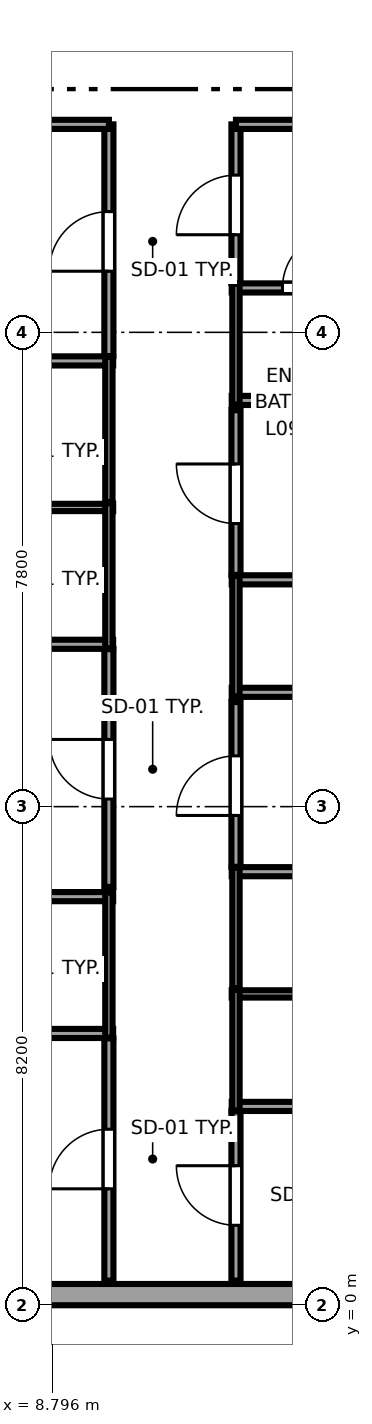
"""IFC4 building model, lengths in metres.
Left out: names, types, materials, properties, quantities, classifications, styles, units other than length and angle.
Written with IfcOpenShell. Run it as: python <this file> out.ifc"""

import sys

from ifc_helpers import new_model, si_unit, direction, frame, frame_2d, origin, place, context, subcontext, project, spatial, rectangle, extrude, source, transform, mapped, element, fill, save


model = new_model("IFC4")
c1 = context("Model", 3, precision=1e-05, world=origin(), true_north=direction((0.0, 1.0)))
c2 = subcontext(c1, "Body", "Model", "MODEL_VIEW")
j1 = project(units=[si_unit("LENGTHUNIT", "METRE"), si_unit("PLANEANGLEUNIT", "RADIAN")], contexts=[c1])
p1 = place(None, origin())
s1 = spatial("IfcSite", under=j1, at=p1, CompositionType="ELEMENT")
p2 = place(p1, origin())
s2 = spatial("IfcBuilding", under=s1, at=p2, CompositionType="ELEMENT")
p3 = place(p2, frame((0.0, 0.0, 42.65)))
s3 = spatial("IfcBuildingStorey", under=s2, at=p3, CompositionType="ELEMENT", Elevation=42.65)
p4 = place(p3, frame((4.617, 0.175, 0.0), z_axis=(0.0, 0.0, 1.0), x_axis=(1.0, 0.0, 0.0)))
e1 = element("IfcWall", 1, at=p4, inside=s3, PredefinedType="SOLIDWALL", context=c2, shape_type="SweptSolid", body=[
    extrude(rectangle(XDim=18.008, YDim=0.35, at=frame_2d((9.004, 0.0))), origin(), (0.0, 0.0, 1.0), 3.37),
])
p5 = place(p4, frame((14.257, 0.0, 0.68)))
e2 = element("IfcOpeningElement", 2, at=p5, cuts=e1, PredefinedType="OPENING", context=c2, shape_type="SweptSolid", body=[
    extrude(rectangle(XDim=2.1, YDim=1.9, at=frame_2d((1.05, 0.95))), frame((0.0, 0.185, 0.0), z_axis=(0.0, -1.0, 0.0), x_axis=(1.0, 0.0, 0.0)), (0.0, 0.0, 1.0), 0.37),
])
for number, where, z_axis, x_axis in (
    (3, (7.21, 4.47, 0.0), (0.0, 0.0, 1.0), (1.0, 0.0, 0.0)),
    (4, (7.21, 6.72, 0.0), (0.0, 0.0, 1.0), (1.0, 0.0, 0.0)),
):
    element("IfcWall", number, at=place(p3, frame(where, z_axis=z_axis, x_axis=x_axis)), inside=s3, PredefinedType="PARTITIONING", context=c2, shape_type="SweptSolid", body=[
        extrude(rectangle(XDim=2.59, YDim=0.15, at=frame_2d((1.295, 0.0))), origin(), (0.0, 0.0, 1.0), 3.37),
    ])
p6 = place(p3, frame((9.73, 4.4, 0.0), z_axis=(0.0, 0.0, 1.0), x_axis=(0.0, 1.0, 0.0)))
e5 = element("IfcWall", 5, at=p6, inside=s3, PredefinedType="PLUMBINGWALL", context=c2, shape_type="SweptSolid", body=[
    extrude(rectangle(XDim=2.39, YDim=0.12, at=frame_2d((1.195, 0.0))), origin(), (0.0, 0.0, 1.0), 3.37),
])
p7 = place(p3, frame((7.21, 10.87, 0.0), z_axis=(0.0, 0.0, 1.0), x_axis=(1.0, 0.0, 0.0)))
e6 = element("IfcWall", 6, at=p7, inside=s3, PredefinedType="PARTITIONING", context=c2, shape_type="SweptSolid", body=[
    extrude(rectangle(XDim=2.59, YDim=0.15, at=frame_2d((1.295, 0.0))), origin(), (0.0, 0.0, 1.0), 3.37),
])
p8 = place(p3, frame((7.21, 13.12, 0.0), z_axis=(0.0, 0.0, 1.0), x_axis=(1.0, 0.0, 0.0)))
e7 = element("IfcWall", 7, at=p8, inside=s3, PredefinedType="PLUMBINGWALL", context=c2, shape_type="SweptSolid", body=[
    extrude(rectangle(XDim=2.59, YDim=0.12, at=frame_2d((1.295, 0.0))), origin(), (0.0, 0.0, 1.0), 3.37),
])
p9 = place(p3, frame((9.73, 10.8, 0.0), z_axis=(0.0, 0.0, 1.0), x_axis=(0.0, 1.0, 0.0)))
e8 = element("IfcWall", 8, at=p9, inside=s3, PredefinedType="PLUMBINGWALL", context=c2, shape_type="SweptSolid", body=[
    extrude(rectangle(XDim=2.39, YDim=0.12, at=frame_2d((1.195, 0.0))), origin(), (0.0, 0.0, 1.0), 3.37),
])
p10 = place(p3, frame((7.21, 15.53, 0.0), z_axis=(0.0, 0.0, 1.0), x_axis=(1.0, 0.0, 0.0)))
e9 = element("IfcWall", 9, at=p10, inside=s3, PredefinedType="PARTITIONING", context=c2, shape_type="SweptSolid", body=[
    extrude(rectangle(XDim=2.59, YDim=0.15, at=frame_2d((1.295, 0.0))), origin(), (0.0, 0.0, 1.0), 3.37),
])
p11 = place(p3, frame((9.73, 13.21, 0.0), z_axis=(0.0, 0.0, 1.0), x_axis=(0.0, 1.0, 0.0)))
e10 = element("IfcWall", 10, at=p11, inside=s3, PredefinedType="PLUMBINGWALL", context=c2, shape_type="SweptSolid", body=[
    extrude(rectangle(XDim=2.39, YDim=0.12, at=frame_2d((1.195, 0.0))), origin(), (0.0, 0.0, 1.0), 3.37),
])
p12 = place(p3, frame((11.75, 3.27, 0.0), z_axis=(0.0, 0.0, 1.0), x_axis=(1.0, 0.0, 0.0)))
e11 = element("IfcWall", 11, at=p12, inside=s3, PredefinedType="PARTITIONING", context=c2, shape_type="SweptSolid", body=[
    extrude(rectangle(XDim=2.59, YDim=0.15, at=frame_2d((1.295, 0.0))), origin(), (0.0, 0.0, 1.0), 3.37),
])
p13 = place(p3, frame((11.75, 5.12, 0.0), z_axis=(0.0, 0.0, 1.0), x_axis=(1.0, 0.0, 0.0)))
e12 = element("IfcWall", 12, at=p13, inside=s3, PredefinedType="PLUMBINGWALL", context=c2, shape_type="SweptSolid", body=[
    extrude(rectangle(XDim=2.59, YDim=0.12, at=frame_2d((1.295, 0.0))), origin(), (0.0, 0.0, 1.0), 3.37),
])
p14 = place(p3, frame((11.82, 3.2, 0.0), z_axis=(0.0, 0.0, 1.0), x_axis=(0.0, 1.0, 0.0)))
e13 = element("IfcWall", 13, at=p14, inside=s3, PredefinedType="PLUMBINGWALL", context=c2, shape_type="SweptSolid", body=[
    extrude(rectangle(XDim=1.99, YDim=0.12, at=frame_2d((0.995, 0.0))), origin(), (0.0, 0.0, 1.0), 3.37),
])
p15 = place(p3, frame((11.75, 7.13, 0.0), z_axis=(0.0, 0.0, 1.0), x_axis=(1.0, 0.0, 0.0)))
e14 = element("IfcWall", 14, at=p15, inside=s3, PredefinedType="PARTITIONING", context=c2, shape_type="SweptSolid", body=[
    extrude(rectangle(XDim=2.59, YDim=0.15, at=frame_2d((1.295, 0.0))), origin(), (0.0, 0.0, 1.0), 3.37),
])
p16 = place(p3, frame((11.82, 5.21, 0.0), z_axis=(0.0, 0.0, 1.0), x_axis=(0.0, 1.0, 0.0)))
e15 = element("IfcWall", 15, at=p16, inside=s3, PredefinedType="PLUMBINGWALL", context=c2, shape_type="SweptSolid", body=[
    extrude(rectangle(XDim=1.99, YDim=0.12, at=frame_2d((0.995, 0.0))), origin(), (0.0, 0.0, 1.0), 3.37),
])
p17 = place(p3, frame((11.75, 10.08, 0.0), z_axis=(0.0, 0.0, 1.0), x_axis=(1.0, 0.0, 0.0)))
e16 = element("IfcWall", 16, at=p17, inside=s3, PredefinedType="PARTITIONING", context=c2, shape_type="SweptSolid", body=[
    extrude(rectangle(XDim=10.6, YDim=0.15, at=frame_2d((5.3, 0.0))), origin(), (0.0, 0.0, 1.0), 3.37),
])
p18 = place(p3, frame((11.75, 11.93, 0.0), z_axis=(0.0, 0.0, 1.0), x_axis=(1.0, 0.0, 0.0)))
e17 = element("IfcWall", 17, at=p18, inside=s3, PredefinedType="PARTITIONING", context=c2, shape_type="SweptSolid", body=[
    extrude(rectangle(XDim=2.59, YDim=0.15, at=frame_2d((1.295, 0.0))), origin(), (0.0, 0.0, 1.0), 3.37),
])
p19 = place(p3, frame((11.82, 10.01, 0.0), z_axis=(0.0, 0.0, 1.0), x_axis=(0.0, 1.0, 0.0)))
e18 = element("IfcWall", 18, at=p19, inside=s3, PredefinedType="PLUMBINGWALL", context=c2, shape_type="SweptSolid", body=[
    extrude(rectangle(XDim=1.99, YDim=0.12, at=frame_2d((0.995, 0.0))), origin(), (0.0, 0.0, 1.0), 3.37),
])
p20 = place(p3, frame((11.75, 14.88, 0.0), z_axis=(0.0, 0.0, 1.0), x_axis=(1.0, 0.0, 0.0)))
e19 = element("IfcWall", 19, at=p20, inside=s3, PredefinedType="PARTITIONING", context=c2, shape_type="SweptSolid", body=[
    extrude(rectangle(XDim=10.6, YDim=0.15, at=frame_2d((5.3, 0.0))), origin(), (0.0, 0.0, 1.0), 3.37),
])
p21 = place(p3, frame((11.75, 16.73, 0.0), z_axis=(0.0, 0.0, 1.0), x_axis=(1.0, 0.0, 0.0)))
e20 = element("IfcWall", 20, at=p21, inside=s3, PredefinedType="PARTITIONING", context=c2, shape_type="SweptSolid", body=[
    extrude(rectangle(XDim=2.59, YDim=0.15, at=frame_2d((1.295, 0.0))), origin(), (0.0, 0.0, 1.0), 3.37),
])
p22 = place(p21, frame((0.835, 0.0, 0.0)))
e21 = element("IfcOpeningElement", 21, at=p22, cuts=e20, PredefinedType="OPENING", context=c2, shape_type="SweptSolid", body=[
    extrude(rectangle(XDim=0.92, YDim=2.01, at=frame_2d((0.46, 1.005))), frame((0.0, 0.085, 0.0), z_axis=(0.0, -1.0, 0.0), x_axis=(1.0, 0.0, 0.0)), (0.0, 0.0, 1.0), 0.17),
])
p23 = place(p3, frame((11.82, 14.81, 0.0), z_axis=(0.0, 0.0, 1.0), x_axis=(0.0, 1.0, 0.0)))
e22 = element("IfcWall", 22, at=p23, inside=s3, PredefinedType="PLUMBINGWALL", context=c2, shape_type="SweptSolid", body=[
    extrude(rectangle(XDim=1.99, YDim=0.12, at=frame_2d((0.995, 0.0))), origin(), (0.0, 0.0, 1.0), 3.37),
])
p24 = place(p3, frame((9.73, 0.405, 0.0), z_axis=(0.0, 0.0, 1.0), x_axis=(0.0, 1.0, 0.0)))
e23 = element("IfcWall", 23, at=p24, inside=s3, PredefinedType="PARTITIONING", context=c2, shape_type="SweptSolid", body=[
    extrude(rectangle(XDim=3.985, YDim=0.15, at=frame_2d((1.992, 0.0))), origin(), (0.0, 0.0, 1.0), 3.37),
])
p25 = place(p24, frame((1.51, 0.0, 0.0)))
e24 = element("IfcOpeningElement", 24, at=p25, cuts=e23, PredefinedType="OPENING", context=c2, shape_type="SweptSolid", body=[
    extrude(rectangle(XDim=0.98, YDim=2.12, at=frame_2d((0.49, 1.06))), frame((0.0, 0.085, 0.0), z_axis=(0.0, -1.0, 0.0), x_axis=(1.0, 0.0, 0.0)), (0.0, 0.0, 1.0), 0.17),
])
p26 = place(p3, frame((9.73, 6.88, 0.0), z_axis=(0.0, 0.0, 1.0), x_axis=(0.0, 1.0, 0.0)))
e25 = element("IfcWall", 25, at=p26, inside=s3, PredefinedType="PARTITIONING", context=c2, shape_type="SweptSolid", body=[
    extrude(rectangle(XDim=3.91, YDim=0.15, at=frame_2d((1.955, 0.0))), origin(), (0.0, 0.0, 1.0), 3.37),
])
p27 = place(p26, frame((1.445, 0.0, 0.0)))
e26 = element("IfcOpeningElement", 26, at=p27, cuts=e25, PredefinedType="OPENING", context=c2, shape_type="SweptSolid", body=[
    extrude(rectangle(XDim=0.98, YDim=2.12, at=frame_2d((0.49, 1.06))), frame((0.0, 0.085, 0.0), z_axis=(0.0, -1.0, 0.0), x_axis=(1.0, 0.0, 0.0)), (0.0, 0.0, 1.0), 0.17),
])
p28 = place(p3, frame((9.73, 15.61, 0.0), z_axis=(0.0, 0.0, 1.0), x_axis=(0.0, 1.0, 0.0)))
e27 = element("IfcWall", 27, at=p28, inside=s3, PredefinedType="PARTITIONING", context=c2, shape_type="SweptSolid", body=[
    extrude(rectangle(XDim=3.81, YDim=0.15, at=frame_2d((1.905, 0.0))), origin(), (0.0, 0.0, 1.0), 3.37),
])
p29 = place(p28, frame((1.395, 0.0, 0.0)))
e28 = element("IfcOpeningElement", 28, at=p29, cuts=e27, PredefinedType="OPENING", context=c2, shape_type="SweptSolid", body=[
    extrude(rectangle(XDim=0.98, YDim=2.12, at=frame_2d((0.49, 1.06))), frame((0.0, 0.085, 0.0), z_axis=(0.0, -1.0, 0.0), x_axis=(1.0, 0.0, 0.0)), (0.0, 0.0, 1.0), 0.17),
])
p30 = place(p3, frame((0.405, 19.42, 0.0), z_axis=(0.0, 0.0, 1.0), x_axis=(1.0, 0.0, 0.0)))
e29 = element("IfcWall", 29, at=p30, inside=s3, PredefinedType="PARTITIONING", context=c2, shape_type="SweptSolid", body=[
    extrude(rectangle(XDim=9.325, YDim=0.15, at=frame_2d((4.663, 0.0))), origin(), (0.0, 0.0, 1.0), 3.37),
])
p31 = place(p3, frame((11.82, 0.405, 0.0), z_axis=(0.0, 0.0, 1.0), x_axis=(0.0, 1.0, 0.0)))
e30 = element("IfcWall", 30, at=p31, inside=s3, PredefinedType="PARTITIONING", context=c2, shape_type="SweptSolid", body=[
    extrude(rectangle(XDim=2.785, YDim=0.15, at=frame_2d((1.393, 0.0))), origin(), (0.0, 0.0, 1.0), 3.37),
])
p32 = place(p31, frame((0.91, 0.0, 0.0)))
e31 = element("IfcOpeningElement", 31, at=p32, cuts=e30, PredefinedType="OPENING", context=c2, shape_type="SweptSolid", body=[
    extrude(rectangle(XDim=0.98, YDim=2.12, at=frame_2d((0.49, 1.06))), frame((0.0, 0.085, 0.0), z_axis=(0.0, -1.0, 0.0), x_axis=(1.0, 0.0, 0.0)), (0.0, 0.0, 1.0), 0.17),
])
p33 = place(p3, frame((11.82, 7.21, 0.0), z_axis=(0.0, 0.0, 1.0), x_axis=(0.0, 1.0, 0.0)))
e32 = element("IfcWall", 32, at=p33, inside=s3, PredefinedType="PARTITIONING", context=c2, shape_type="SweptSolid", body=[
    extrude(rectangle(XDim=2.71, YDim=0.15, at=frame_2d((1.355, 0.0))), origin(), (0.0, 0.0, 1.0), 3.37),
])
p34 = place(p33, frame((0.845, 0.0, 0.0)))
e33 = element("IfcOpeningElement", 33, at=p34, cuts=e32, PredefinedType="OPENING", context=c2, shape_type="SweptSolid", body=[
    extrude(rectangle(XDim=0.98, YDim=2.12, at=frame_2d((0.49, 1.06))), frame((0.0, 0.085, 0.0), z_axis=(0.0, -1.0, 0.0), x_axis=(1.0, 0.0, 0.0)), (0.0, 0.0, 1.0), 0.17),
])
p35 = place(p3, frame((11.82, 12.01, 0.0), z_axis=(0.0, 0.0, 1.0), x_axis=(0.0, 1.0, 0.0)))
e34 = element("IfcWall", 34, at=p35, inside=s3, PredefinedType="PARTITIONING", context=c2, shape_type="SweptSolid", body=[
    extrude(rectangle(XDim=2.71, YDim=0.15, at=frame_2d((1.355, 0.0))), origin(), (0.0, 0.0, 1.0), 3.37),
])
p36 = place(p35, frame((0.845, 0.0, 0.0)))
e35 = element("IfcOpeningElement", 35, at=p36, cuts=e34, PredefinedType="OPENING", context=c2, shape_type="SweptSolid", body=[
    extrude(rectangle(XDim=0.98, YDim=2.12, at=frame_2d((0.49, 1.06))), frame((0.0, 0.085, 0.0), z_axis=(0.0, -1.0, 0.0), x_axis=(1.0, 0.0, 0.0)), (0.0, 0.0, 1.0), 0.17),
])
p37 = place(p3, frame((11.82, 16.81, 0.0), z_axis=(0.0, 0.0, 1.0), x_axis=(0.0, 1.0, 0.0)))
e36 = element("IfcWall", 36, at=p37, inside=s3, PredefinedType="PARTITIONING", context=c2, shape_type="SweptSolid", body=[
    extrude(rectangle(XDim=2.61, YDim=0.15, at=frame_2d((1.305, 0.0))), origin(), (0.0, 0.0, 1.0), 3.37),
])
p38 = place(p37, frame((0.795, 0.0, 0.0)))
e37 = element("IfcOpeningElement", 37, at=p38, cuts=e36, PredefinedType="OPENING", context=c2, shape_type="SweptSolid", body=[
    extrude(rectangle(XDim=0.98, YDim=2.12, at=frame_2d((0.49, 1.06))), frame((0.0, 0.085, 0.0), z_axis=(0.0, -1.0, 0.0), x_axis=(1.0, 0.0, 0.0)), (0.0, 0.0, 1.0), 0.17),
])
p39 = place(p3, frame((11.82, 19.42, 0.0), z_axis=(0.0, 0.0, 1.0), x_axis=(1.0, 0.0, 0.0)))
e38 = element("IfcWall", 38, at=p39, inside=s3, PredefinedType="PARTITIONING", context=c2, shape_type="SweptSolid", body=[
    extrude(rectangle(XDim=10.53, YDim=0.15, at=frame_2d((5.265, 0.0))), origin(), (0.0, 0.0, 1.0), 3.37),
])
m1 = source(origin(), c2, "Body", "SweptSolid", [
    extrude(rectangle(XDim=0.92, YDim=2.01, at=frame_2d((0.46, 1.005))), frame((0.0, 0.025, 0.0), z_axis=(0.0, -1.0, 0.0), x_axis=(1.0, 0.0, 0.0)), (0.0, 0.0, 1.0), 0.05),
])
p40 = place(p22, origin())
e39 = element("IfcDoor", 39, at=p40, inside=s3, OperationType="SINGLE_SWING_RIGHT", PredefinedType="DOOR", context=c2, shape_type="MappedRepresentation", body=[
    mapped(m1, transform((0.0, 0.0, 0.0), x_axis=(1.0, 0.0, 0.0), y_axis=(0.0, 1.0, 0.0), z_axis=(0.0, 0.0, 1.0), scale=1.0)),
])
fill(e21, e39)
m2 = source(origin(), c2, "Body", "SweptSolid", [
    extrude(rectangle(XDim=0.98, YDim=2.12, at=frame_2d((0.49, 1.06))), frame((0.0, 0.025, 0.0), z_axis=(0.0, -1.0, 0.0), x_axis=(1.0, 0.0, 0.0)), (0.0, 0.0, 1.0), 0.05),
])
p41 = place(p25, origin())
e40 = element("IfcDoor", 40, at=p41, inside=s3, OperationType="SINGLE_SWING_LEFT", PredefinedType="DOOR", context=c2, shape_type="MappedRepresentation", body=[
    mapped(m2, transform((0.0, 0.0, 0.0), x_axis=(1.0, 0.0, 0.0), y_axis=(0.0, 1.0, 0.0), z_axis=(0.0, 0.0, 1.0), scale=1.0)),
])
fill(e24, e40)
p42 = place(p27, origin())
e41 = element("IfcDoor", 41, at=p42, inside=s3, OperationType="SINGLE_SWING_RIGHT", PredefinedType="DOOR", context=c2, shape_type="MappedRepresentation", body=[
    mapped(m2, transform((0.0, 0.0, 0.0), x_axis=(1.0, 0.0, 0.0), y_axis=(0.0, 1.0, 0.0), z_axis=(0.0, 0.0, 1.0), scale=1.0)),
])
fill(e26, e41)
p43 = place(p29, origin())
e42 = element("IfcDoor", 42, at=p43, inside=s3, OperationType="SINGLE_SWING_LEFT", PredefinedType="DOOR", context=c2, shape_type="MappedRepresentation", body=[
    mapped(m2, transform((0.0, 0.0, 0.0), x_axis=(1.0, 0.0, 0.0), y_axis=(0.0, 1.0, 0.0), z_axis=(0.0, 0.0, 1.0), scale=1.0)),
])
fill(e28, e42)
p44 = place(p32, origin())
e43 = element("IfcDoor", 43, at=p44, inside=s3, OperationType="SINGLE_SWING_RIGHT", PredefinedType="DOOR", context=c2, shape_type="MappedRepresentation", body=[
    mapped(m2, transform((0.0, 0.0, 0.0), x_axis=(1.0, 0.0, 0.0), y_axis=(0.0, 1.0, 0.0), z_axis=(0.0, 0.0, 1.0), scale=1.0)),
])
fill(e31, e43)
p45 = place(p34, origin())
e44 = element("IfcDoor", 44, at=p45, inside=s3, OperationType="SINGLE_SWING_LEFT", PredefinedType="DOOR", context=c2, shape_type="MappedRepresentation", body=[
    mapped(m2, transform((0.0, 0.0, 0.0), x_axis=(1.0, 0.0, 0.0), y_axis=(0.0, 1.0, 0.0), z_axis=(0.0, 0.0, 1.0), scale=1.0)),
])
fill(e33, e44)
p46 = place(p36, origin())
e45 = element("IfcDoor", 45, at=p46, inside=s3, OperationType="SINGLE_SWING_RIGHT", PredefinedType="DOOR", context=c2, shape_type="MappedRepresentation", body=[
    mapped(m2, transform((0.0, 0.0, 0.0), x_axis=(1.0, 0.0, 0.0), y_axis=(0.0, 1.0, 0.0), z_axis=(0.0, 0.0, 1.0), scale=1.0)),
])
fill(e35, e45)
p47 = place(p38, origin())
e46 = element("IfcDoor", 46, at=p47, inside=s3, OperationType="SINGLE_SWING_LEFT", PredefinedType="DOOR", context=c2, shape_type="MappedRepresentation", body=[
    mapped(m2, transform((0.0, 0.0, 0.0), x_axis=(1.0, 0.0, 0.0), y_axis=(0.0, 1.0, 0.0), z_axis=(0.0, 0.0, 1.0), scale=1.0)),
])
fill(e37, e46)
save(model, sys.argv[1])
